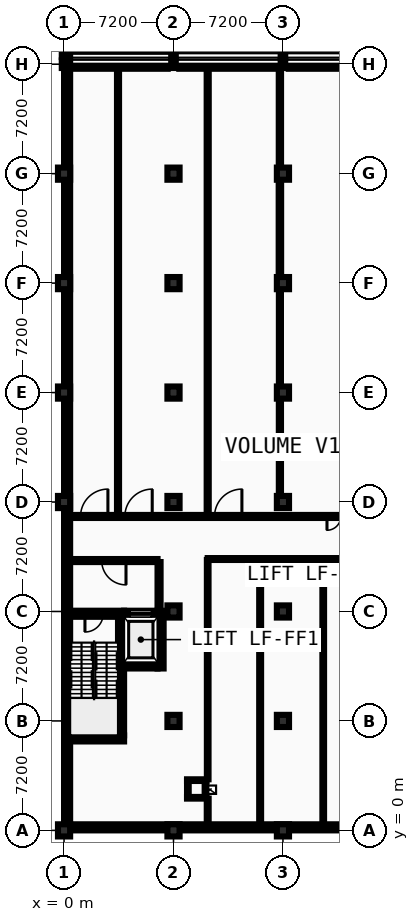
"""IFC4 building model, lengths in metres.
Left out: names, types, materials, properties, quantities, classifications, styles, units other than length and angle.
Written with IfcOpenShell. Run it as: python <this file> out.ifc"""

import sys

from ifc_helpers import new_model, si_unit, direction, frame, frame_2d, origin, origin_2d, place, context, subcontext, project, spatial, rectangle, i_section, extrude, element, fill, save


model = new_model("IFC4")
c1 = context("Model", 3, precision=1e-05, world=origin(), true_north=direction((0.0, 1.0)))
c2 = subcontext(c1, "Body", "Model", "MODEL_VIEW")
j1 = project(units=[si_unit("LENGTHUNIT", "METRE"), si_unit("PLANEANGLEUNIT", "RADIAN")], contexts=[c1])
p1 = place(None, origin())
s1 = spatial("IfcSite", under=j1, at=p1, CompositionType="ELEMENT")
p2 = place(p1, origin())
s2 = spatial("IfcBuilding", under=s1, at=p2, CompositionType="ELEMENT")
p3 = place(p2, frame((0.0, 0.0, -4.8)))
s3 = spatial("IfcBuildingStorey", under=s2, at=p3, CompositionType="ELEMENT", Elevation=-4.8)
for number, where, z_axis, x_axis in (
    (1, (0.0, 0.0, 0.0), (0.0, 0.0, 1.0), (1.0, 0.0, 0.0)),
    (2, (0.0, 21.6, 0.0), (0.0, 0.0, 1.0), (1.0, 0.0, 0.0)),
    (3, (0.0, 28.8, 0.0), (0.0, 0.0, 1.0), (1.0, 0.0, 0.0)),
    (4, (0.0, 36.0, 0.0), (0.0, 0.0, 1.0), (1.0, 0.0, 0.0)),
    (5, (0.0, 43.2, 0.0), (0.0, 0.0, 1.0), (1.0, 0.0, 0.0)),
):
    element("IfcColumn", number, at=place(p3, frame(where, z_axis=z_axis, x_axis=x_axis)), inside=s3, PredefinedType="COLUMN", context=c2, shape_type="SweptSolid", body=[
        extrude(rectangle(XDim=0.8, YDim=0.8, at=origin_2d()), origin(), (0.0, 0.0, 1.0), 4.8),
    ])
for number, where, z_axis, x_axis in (
    (6, (0.0, 50.4, 0.0), (0.0, 0.0, 1.0), (1.0, 0.0, 0.0)),
    (7, (0.0, 51.12, 0.0), (0.0, 0.0, 1.0), (1.0, 0.0, 0.0)),
):
    element("IfcColumn", number, at=place(p3, frame(where, z_axis=z_axis, x_axis=x_axis)), inside=s3, PredefinedType="COLUMN", context=c2, shape_type="SweptSolid", body=[
        extrude(i_section(OverallWidth=0.3, OverallDepth=0.5, WebThickness=0.014, FlangeThickness=0.028, FilletRadius=0.027, at=origin_2d()), origin(), (0.0, 0.0, 1.0), 4.8),
    ])
for number, where, z_axis, x_axis in (
    (8, (7.2, 0.0, 0.0), (0.0, 0.0, 1.0), (1.0, 0.0, 0.0)),
    (9, (7.2, 7.2, 0.0), (0.0, 0.0, 1.0), (1.0, 0.0, 0.0)),
    (10, (7.2, 14.4, 0.0), (0.0, 0.0, 1.0), (1.0, 0.0, 0.0)),
    (11, (7.2, 21.6, 0.0), (0.0, 0.0, 1.0), (1.0, 0.0, 0.0)),
    (12, (7.2, 28.8, 0.0), (0.0, 0.0, 1.0), (1.0, 0.0, 0.0)),
    (13, (7.2, 36.0, 0.0), (0.0, 0.0, 1.0), (1.0, 0.0, 0.0)),
    (14, (7.2, 43.2, 0.0), (0.0, 0.0, 1.0), (1.0, 0.0, 0.0)),
):
    element("IfcColumn", number, at=place(p3, frame(where, z_axis=z_axis, x_axis=x_axis)), inside=s3, PredefinedType="COLUMN", context=c2, shape_type="SweptSolid", body=[
        extrude(rectangle(XDim=0.8, YDim=0.8, at=origin_2d()), origin(), (0.0, 0.0, 1.0), 4.8),
    ])
for number, where, z_axis, x_axis in (
    (15, (7.2, 50.4, 0.0), (0.0, 0.0, 1.0), (1.0, 0.0, 0.0)),
    (16, (7.2, 51.12, 0.0), (0.0, 0.0, 1.0), (1.0, 0.0, 0.0)),
):
    element("IfcColumn", number, at=place(p3, frame(where, z_axis=z_axis, x_axis=x_axis)), inside=s3, PredefinedType="COLUMN", context=c2, shape_type="SweptSolid", body=[
        extrude(i_section(OverallWidth=0.3, OverallDepth=0.5, WebThickness=0.014, FlangeThickness=0.028, FilletRadius=0.027, at=origin_2d()), origin(), (0.0, 0.0, 1.0), 4.8),
    ])
for number, where, z_axis, x_axis in (
    (17, (14.4, 0.0, 0.0), (0.0, 0.0, 1.0), (1.0, 0.0, 0.0)),
    (18, (14.4, 7.2, 0.0), (0.0, 0.0, 1.0), (1.0, 0.0, 0.0)),
    (19, (14.4, 14.4, 0.0), (0.0, 0.0, 1.0), (1.0, 0.0, 0.0)),
    (20, (14.4, 21.6, 0.0), (0.0, 0.0, 1.0), (1.0, 0.0, 0.0)),
    (21, (14.4, 28.8, 0.0), (0.0, 0.0, 1.0), (1.0, 0.0, 0.0)),
    (22, (14.4, 36.0, 0.0), (0.0, 0.0, 1.0), (1.0, 0.0, 0.0)),
    (23, (14.4, 43.2, 0.0), (0.0, 0.0, 1.0), (1.0, 0.0, 0.0)),
):
    element("IfcColumn", number, at=place(p3, frame(where, z_axis=z_axis, x_axis=x_axis)), inside=s3, PredefinedType="COLUMN", context=c2, shape_type="SweptSolid", body=[
        extrude(rectangle(XDim=0.8, YDim=0.8, at=origin_2d()), origin(), (0.0, 0.0, 1.0), 4.8),
    ])
for number, where, z_axis, x_axis in (
    (24, (14.4, 50.4, 0.0), (0.0, 0.0, 1.0), (1.0, 0.0, 0.0)),
    (25, (14.4, 51.12, 0.0), (0.0, 0.0, 1.0), (1.0, 0.0, 0.0)),
):
    element("IfcColumn", number, at=place(p3, frame(where, z_axis=z_axis, x_axis=x_axis)), inside=s3, PredefinedType="COLUMN", context=c2, shape_type="SweptSolid", body=[
        extrude(i_section(OverallWidth=0.3, OverallDepth=0.5, WebThickness=0.014, FlangeThickness=0.028, FilletRadius=0.027, at=origin_2d()), origin(), (0.0, 0.0, 1.0), 4.8),
    ])
p4 = place(p3, frame((0.0, 0.2, 0.0), z_axis=(0.0, 0.0, 1.0), x_axis=(1.0, 0.0, 0.0)))
e26 = element("IfcWall", 26, at=p4, inside=s3, PredefinedType="USERDEFINED", context=c2, shape_type="SweptSolid", body=[
    extrude(rectangle(XDim=86.4, YDim=0.4, at=frame_2d((43.2, 0.0))), origin(), (0.0, 0.0, 1.0), 4.545),
])
p5 = place(p3, frame((0.2, 81.6, 0.0), z_axis=(0.0, 0.0, 1.0), x_axis=(0.0, -1.0, 0.0)))
e27 = element("IfcWall", 27, at=p5, inside=s3, PredefinedType="USERDEFINED", context=c2, shape_type="SweptSolid", body=[
    extrude(rectangle(XDim=81.2, YDim=0.4, at=frame_2d((40.6, 0.0))), origin(), (0.0, 0.0, 1.0), 4.545),
])
p6 = place(p3, frame((0.0, 6.05, 0.0), z_axis=(0.0, 0.0, 1.0), x_axis=(1.0, 0.0, 0.0)))
e28 = element("IfcWall", 28, at=p6, inside=s3, PredefinedType="SHEAR", context=c2, shape_type="SweptSolid", body=[
    extrude(rectangle(XDim=3.95, YDim=0.4, at=frame_2d((1.975, 0.0))), origin(), (0.0, 0.0, 1.0), 4.545),
])
p7 = place(p3, frame((0.0, 14.25, 0.0), z_axis=(0.0, 0.0, 1.0), x_axis=(1.0, 0.0, 0.0)))
e29 = element("IfcWall", 29, at=p7, inside=s3, PredefinedType="SHEAR", context=c2, shape_type="SweptSolid", body=[
    extrude(rectangle(XDim=3.95, YDim=0.4, at=frame_2d((1.975, 0.0))), origin(), (0.0, 0.0, 1.0), 4.545),
])
p8 = place(p7, frame((1.375, 0.0, 0.0)))
e30 = element("IfcOpeningElement", 30, at=p8, cuts=e29, PredefinedType="OPENING", context=c2, shape_type="SweptSolid", body=[
    extrude(rectangle(XDim=1.2, YDim=2.15, at=frame_2d((0.6, 1.075))), frame((0.0, 0.21, 0.0), z_axis=(0.0, -1.0, 0.0), x_axis=(1.0, 0.0, 0.0)), (0.0, 0.0, 1.0), 0.42),
])
p9 = place(p3, frame((3.75, 6.25, 0.0), z_axis=(0.0, 0.0, 1.0), x_axis=(0.0, 1.0, 0.0)))
e31 = element("IfcWall", 31, at=p9, inside=s3, PredefinedType="SHEAR", context=c2, shape_type="SweptSolid", body=[
    extrude(rectangle(XDim=7.8, YDim=0.4, at=frame_2d((3.9, 0.0))), origin(), (0.0, 0.0, 1.0), 4.545),
])
p10 = place(p3, frame((3.95, 10.85, 0.0), z_axis=(0.0, 0.0, 1.0), x_axis=(1.0, 0.0, 0.0)))
e32 = element("IfcWall", 32, at=p10, inside=s3, PredefinedType="SHEAR", context=c2, shape_type="SweptSolid", body=[
    extrude(rectangle(XDim=2.2, YDim=0.4, at=frame_2d((1.1, 0.0))), origin(), (0.0, 0.0, 1.0), 4.545),
])
p11 = place(p3, frame((3.95, 14.25, 0.0), z_axis=(0.0, 0.0, 1.0), x_axis=(1.0, 0.0, 0.0)))
e33 = element("IfcWall", 33, at=p11, inside=s3, PredefinedType="SHEAR", context=c2, shape_type="SweptSolid", body=[
    extrude(rectangle(XDim=2.2, YDim=0.4, at=frame_2d((1.1, 0.0))), origin(), (0.0, 0.0, 1.0), 4.545),
])
p12 = place(p11, frame((0.4, 0.0, 0.0)))
e34 = element("IfcOpeningElement", 34, at=p12, cuts=e33, PredefinedType="OPENING", context=c2, shape_type="SweptSolid", body=[
    extrude(rectangle(XDim=1.4, YDim=2.2, at=frame_2d((0.7, 1.1))), frame((0.0, 0.21, 0.0), z_axis=(0.0, -1.0, 0.0), x_axis=(1.0, 0.0, 0.0)), (0.0, 0.0, 1.0), 0.42),
])
p13 = place(p3, frame((6.35, 10.65, 0.0), z_axis=(0.0, 0.0, 1.0), x_axis=(0.0, 1.0, 0.0)))
e35 = element("IfcWall", 35, at=p13, inside=s3, PredefinedType="SHEAR", context=c2, shape_type="SweptSolid", body=[
    extrude(rectangle(XDim=3.8, YDim=0.4, at=frame_2d((1.9, 0.0))), origin(), (0.0, 0.0, 1.0), 4.545),
])
p14 = place(p3, frame((0.4, 17.75, 0.0), z_axis=(0.0, 0.0, 1.0), x_axis=(1.0, 0.0, 0.0)))
e36 = element("IfcWall", 36, at=p14, inside=s3, PredefinedType="PARTITIONING", context=c2, shape_type="SweptSolid", body=[
    extrude(rectangle(XDim=5.75, YDim=0.2, at=frame_2d((2.875, 0.0))), origin(), (0.0, 0.0, 1.0), 4.545),
])
p15 = place(p14, frame((2.075, 0.0, 0.0)))
e37 = element("IfcOpeningElement", 37, at=p15, cuts=e36, PredefinedType="OPENING", context=c2, shape_type="SweptSolid", body=[
    extrude(rectangle(XDim=1.6, YDim=2.2, at=frame_2d((0.8, 1.1))), frame((0.0, 0.11, 0.0), z_axis=(0.0, -1.0, 0.0), x_axis=(1.0, 0.0, 0.0)), (0.0, 0.0, 1.0), 0.22),
])
p16 = place(p3, frame((6.25, 14.45, 0.0), z_axis=(0.0, 0.0, 1.0), x_axis=(0.0, 1.0, 0.0)))
e38 = element("IfcWall", 38, at=p16, inside=s3, PredefinedType="PARTITIONING", context=c2, shape_type="SweptSolid", body=[
    extrude(rectangle(XDim=3.2, YDim=0.2, at=frame_2d((1.6, 0.0))), origin(), (0.0, 0.0, 1.0), 4.545),
])
for number, where, z_axis, x_axis in (
    (39, (8.09, 2.145, 0.0), (0.0, 0.0, 1.0), (1.0, 0.0, 0.0)),
    (40, (8.09, 3.305, 0.0), (0.0, 0.0, 1.0), (1.0, 0.0, 0.0)),
):
    element("IfcWall", number, at=place(p3, frame(where, z_axis=z_axis, x_axis=x_axis)), inside=s3, PredefinedType="PARTITIONING", context=c2, shape_type="SweptSolid", body=[
        extrude(rectangle(XDim=1.27, YDim=0.11, at=frame_2d((0.635, 0.0))), origin(), (0.0, 0.0, 1.0), 4.54),
    ])
for number, where, z_axis, x_axis in (
    (41, (8.145, 2.2, 0.0), (0.0, 0.0, 1.0), (0.0, 1.0, 0.0)),
    (42, (9.305, 2.2, 0.0), (0.0, 0.0, 1.0), (0.0, 1.0, 0.0)),
):
    element("IfcWall", number, at=place(p3, frame(where, z_axis=z_axis, x_axis=x_axis)), inside=s3, PredefinedType="PARTITIONING", context=c2, shape_type="SweptSolid", body=[
        extrude(rectangle(XDim=1.05, YDim=0.11, at=frame_2d((0.525, 0.0))), origin(), (0.0, 0.0, 1.0), 4.54),
    ])
p17 = place(p3, frame((9.45, 17.85, 0.0), z_axis=(0.0, 0.0, 1.0), x_axis=(1.0, 0.0, 0.0)))
e43 = element("IfcWall", 43, at=p17, inside=s3, PredefinedType="PARTITIONING", context=c2, shape_type="SweptSolid", body=[
    extrude(rectangle(XDim=12.75, YDim=0.125, at=frame_2d((6.375, 0.0))), origin(), (0.0, 0.0, 1.0), 4.545),
])
p18 = place(p17, frame((1.225, 0.0, 0.0)))
e44 = element("IfcOpeningElement", 44, at=p18, cuts=e43, PredefinedType="OPENING", context=c2, shape_type="SweptSolid", body=[
    extrude(rectangle(XDim=1.0, YDim=2.1, at=frame_2d((0.5, 1.05))), frame((0.0, 0.073, 0.0), z_axis=(0.0, -1.0, 0.0), x_axis=(1.0, 0.0, 0.0)), (0.0, 0.0, 1.0), 0.145),
])
p19 = place(p17, frame((6.25, 0.0, 0.0)))
e45 = element("IfcOpeningElement", 45, at=p19, cuts=e43, PredefinedType="OPENING", context=c2, shape_type="SweptSolid", body=[
    extrude(rectangle(XDim=0.9, YDim=2.1, at=frame_2d((0.45, 1.05))), frame((0.0, 0.073, 0.0), z_axis=(0.0, -1.0, 0.0), x_axis=(1.0, 0.0, 0.0)), (0.0, 0.0, 1.0), 0.145),
])
p20 = place(p17, frame((8.05, 0.0, 0.0)))
e46 = element("IfcOpeningElement", 46, at=p20, cuts=e43, PredefinedType="OPENING", context=c2, shape_type="SweptSolid", body=[
    extrude(rectangle(XDim=0.88, YDim=2.04, at=frame_2d((0.44, 1.02))), frame((0.0, 0.073, 0.0), z_axis=(0.0, -1.0, 0.0), x_axis=(1.0, 0.0, 0.0)), (0.0, 0.0, 1.0), 0.145),
])
p21 = place(p3, frame((0.42, 20.65, 0.0), z_axis=(0.0, 0.0, 1.0), x_axis=(1.0, 0.0, 0.0)))
e47 = element("IfcWall", 47, at=p21, inside=s3, PredefinedType="PARTITIONING", context=c2, shape_type="SweptSolid", body=[
    extrude(rectangle(XDim=28.18, YDim=0.2, at=frame_2d((14.09, 0.0))), origin(), (0.0, 0.0, 1.0), 4.545),
])
p22 = place(p21, frame((0.665, 0.0, 0.0)))
e48 = element("IfcOpeningElement", 48, at=p22, cuts=e47, PredefinedType="OPENING", context=c2, shape_type="SweptSolid", body=[
    extrude(rectangle(XDim=1.8, YDim=2.3, at=frame_2d((0.9, 1.15))), frame((0.0, 0.11, 0.0), z_axis=(0.0, -1.0, 0.0), x_axis=(1.0, 0.0, 0.0)), (0.0, 0.0, 1.0), 0.22),
])
p23 = place(p21, frame((9.48, 0.0, 0.0)))
e49 = element("IfcOpeningElement", 49, at=p23, cuts=e47, PredefinedType="OPENING", context=c2, shape_type="SweptSolid", body=[
    extrude(rectangle(XDim=1.8, YDim=2.3, at=frame_2d((0.9, 1.15))), frame((0.0, 0.11, 0.0), z_axis=(0.0, -1.0, 0.0), x_axis=(1.0, 0.0, 0.0)), (0.0, 0.0, 1.0), 0.22),
])
p24 = place(p21, frame((3.58, 0.0, 0.0)))
e50 = element("IfcOpeningElement", 50, at=p24, cuts=e47, PredefinedType="OPENING", context=c2, shape_type="SweptSolid", body=[
    extrude(rectangle(XDim=1.8, YDim=2.3, at=frame_2d((0.9, 1.15))), frame((0.0, 0.11, 0.0), z_axis=(0.0, -1.0, 0.0), x_axis=(1.0, 0.0, 0.0)), (0.0, 0.0, 1.0), 0.22),
])
p25 = place(p21, frame((16.877, 0.0, 0.0)))
e51 = element("IfcOpeningElement", 51, at=p25, cuts=e47, PredefinedType="OPENING", context=c2, shape_type="SweptSolid", body=[
    extrude(rectangle(XDim=0.906, YDim=2.04, at=frame_2d((0.453, 1.02))), frame((0.0, 0.11, 0.0), z_axis=(0.0, -1.0, 0.0), x_axis=(1.0, 0.0, 0.0)), (0.0, 0.0, 1.0), 0.22),
])
p26 = place(p21, frame((24.064, 0.0, 0.0)))
e52 = element("IfcOpeningElement", 52, at=p26, cuts=e47, PredefinedType="OPENING", context=c2, shape_type="SweptSolid", body=[
    extrude(rectangle(XDim=0.932, YDim=2.04, at=frame_2d((0.466, 1.02))), frame((0.0, 0.11, 0.0), z_axis=(0.0, -1.0, 0.0), x_axis=(1.0, 0.0, 0.0)), (0.0, 0.0, 1.0), 0.22),
])
p27 = place(p3, frame((0.42, 50.2, 0.0), z_axis=(0.0, 0.0, 1.0), x_axis=(1.0, 0.0, 0.0)))
e53 = element("IfcWall", 53, at=p27, inside=s3, PredefinedType="PARTITIONING", context=c2, shape_type="SweptSolid", body=[
    extrude(rectangle(XDim=6.4, YDim=0.2, at=frame_2d((3.2, 0.0))), origin(), (0.0, 0.0, 1.0), 4.095),
])
for number, where, z_axis, x_axis in (
    (54, (7.58, 50.2, 0.0), (0.0, 0.0, 1.0), (1.0, 0.0, 0.0)),
    (55, (14.78, 50.2, 0.0), (0.0, 0.0, 1.0), (1.0, 0.0, 0.0)),
):
    element("IfcWall", number, at=place(p3, frame(where, z_axis=z_axis, x_axis=x_axis)), inside=s3, PredefinedType="PARTITIONING", context=c2, shape_type="SweptSolid", body=[
        extrude(rectangle(XDim=6.44, YDim=0.2, at=frame_2d((3.22, 0.0))), origin(), (0.0, 0.0, 1.0), 4.095),
    ])
p28 = place(p3, frame((3.55, 20.75, 0.0), z_axis=(0.0, 0.0, 1.0), x_axis=(0.0, 1.0, 0.0)))
e56 = element("IfcWall", 56, at=p28, inside=s3, PredefinedType="PARTITIONING", context=c2, shape_type="SweptSolid", body=[
    extrude(rectangle(XDim=29.35, YDim=0.135, at=frame_2d((14.675, 0.0))), origin(), (0.0, 0.0, 1.0), 4.545),
])
p29 = place(p3, frame((9.45, 0.4, 0.0), z_axis=(0.0, 0.0, 1.0), x_axis=(0.0, 1.0, 0.0)))
e57 = element("IfcWall", 57, at=p29, inside=s3, PredefinedType="PARTITIONING", context=c2, shape_type="SweptSolid", body=[
    extrude(rectangle(XDim=1.69, YDim=0.125, at=frame_2d((0.845, 0.0))), origin(), (0.0, 0.0, 1.0), 4.235),
])
p30 = place(p3, frame((9.45, 3.36, 0.0), z_axis=(0.0, 0.0, 1.0), x_axis=(0.0, 1.0, 0.0)))
e58 = element("IfcWall", 58, at=p30, inside=s3, PredefinedType="PARTITIONING", context=c2, shape_type="SweptSolid", body=[
    extrude(rectangle(XDim=14.427, YDim=0.11, at=frame_2d((7.214, 0.0))), origin(), (0.0, 0.0, 1.0), 4.235),
])
p31 = place(p3, frame((9.45, 20.75, 0.0), z_axis=(0.0, 0.0, 1.0), x_axis=(0.0, 1.0, 0.0)))
e59 = element("IfcWall", 59, at=p31, inside=s3, PredefinedType="PARTITIONING", context=c2, shape_type="SweptSolid", body=[
    extrude(rectangle(XDim=29.35, YDim=0.135, at=frame_2d((14.675, 0.0))), origin(), (0.0, 0.0, 1.0), 4.235),
])
p32 = place(p3, frame((12.9, 0.4, 0.0), z_axis=(0.0, 0.0, 1.0), x_axis=(0.0, 1.0, 0.0)))
e60 = element("IfcWall", 60, at=p32, inside=s3, PredefinedType="PARTITIONING", context=c2, shape_type="SweptSolid", body=[
    extrude(rectangle(XDim=17.388, YDim=0.125, at=frame_2d((8.694, 0.0))), origin(), (0.0, 0.0, 1.0), 4.545),
])
p33 = place(p3, frame((14.2, 21.98, 0.0), z_axis=(0.0, 0.0, 1.0), x_axis=(0.0, 1.0, 0.0)))
e61 = element("IfcWall", 61, at=p33, inside=s3, PredefinedType="PARTITIONING", context=c2, shape_type="SweptSolid", body=[
    extrude(rectangle(XDim=6.44, YDim=0.142, at=frame_2d((3.22, 0.0))), origin(), (0.0, 0.0, 1.0), 4.245),
])
p34 = place(p3, frame((14.2, 29.18, 0.0), z_axis=(0.0, 0.0, 1.0), x_axis=(0.0, 1.0, 0.0)))
e62 = element("IfcWall", 62, at=p34, inside=s3, PredefinedType="PARTITIONING", context=c2, shape_type="SweptSolid", body=[
    extrude(rectangle(XDim=6.44, YDim=0.135, at=frame_2d((3.22, 0.0))), origin(), (0.0, 0.0, 1.0), 4.245),
])
p35 = place(p3, frame((14.2, 36.38, 0.0), z_axis=(0.0, 0.0, 1.0), x_axis=(0.0, 1.0, 0.0)))
e63 = element("IfcWall", 63, at=p35, inside=s3, PredefinedType="PARTITIONING", context=c2, shape_type="SweptSolid", body=[
    extrude(rectangle(XDim=6.44, YDim=0.16, at=frame_2d((3.22, 0.0))), origin(), (0.0, 0.0, 1.0), 4.245),
])
p36 = place(p3, frame((14.2, 43.58, 0.0), z_axis=(0.0, 0.0, 1.0), x_axis=(0.0, 1.0, 0.0)))
e64 = element("IfcWall", 64, at=p36, inside=s3, PredefinedType="PARTITIONING", context=c2, shape_type="SweptSolid", body=[
    extrude(rectangle(XDim=6.44, YDim=0.15, at=frame_2d((3.22, 0.0))), origin(), (0.0, 0.0, 1.0), 4.245),
])
p37 = place(p3, frame((17.05, 0.4, 0.0), z_axis=(0.0, 0.0, 1.0), x_axis=(0.0, 1.0, 0.0)))
e65 = element("IfcWall", 65, at=p37, inside=s3, PredefinedType="PARTITIONING", context=c2, shape_type="SweptSolid", body=[
    extrude(rectangle(XDim=17.388, YDim=0.11, at=frame_2d((8.694, 0.0))), origin(), (0.0, 0.0, 1.0), 4.545),
])
p38 = place(p8, frame((1.2, 0.0, 0.0), z_axis=(0.0, 0.0, 1.0), x_axis=(-1.0, 0.0, 0.0)))
e66 = element("IfcDoor", 66, at=p38, inside=s3, OperationType="SINGLE_SWING_LEFT", PredefinedType="DOOR", context=c2, shape_type="SweptSolid", body=[
    extrude(rectangle(XDim=1.2, YDim=2.15, at=frame_2d((0.6, 1.075))), frame((0.0, 0.025, 0.0), z_axis=(0.0, -1.0, 0.0), x_axis=(1.0, 0.0, 0.0)), (0.0, 0.0, 1.0), 0.05),
])
fill(e30, e66)
p39 = place(p12, origin())
e67 = element("IfcDoor", 67, at=p39, inside=s3, OperationType="SLIDING_TO_LEFT", PredefinedType="DOOR", context=c2, shape_type="SweptSolid", body=[
    extrude(rectangle(XDim=1.4, YDim=2.2, at=frame_2d((0.7, 1.1))), frame((0.0, 0.025, 0.0), z_axis=(0.0, -1.0, 0.0), x_axis=(1.0, 0.0, 0.0)), (0.0, 0.0, 1.0), 0.05),
])
fill(e34, e67)
p40 = place(p15, origin())
e68 = element("IfcDoor", 68, at=p40, inside=s3, OperationType="DOUBLE_DOOR_SINGLE_SWING", PredefinedType="DOOR", context=c2, shape_type="SweptSolid", body=[
    extrude(rectangle(XDim=1.6, YDim=2.2, at=frame_2d((0.8, 1.1))), frame((0.0, 0.025, 0.0), z_axis=(0.0, -1.0, 0.0), x_axis=(1.0, 0.0, 0.0)), (0.0, 0.0, 1.0), 0.05),
])
fill(e37, e68)
p41 = place(p18, origin())
e69 = element("IfcDoor", 69, at=p41, inside=s3, OperationType="SLIDING_TO_LEFT", PredefinedType="DOOR", context=c2, shape_type="SweptSolid", body=[
    extrude(rectangle(XDim=1.0, YDim=2.1, at=frame_2d((0.5, 1.05))), frame((0.0, 0.025, 0.0), z_axis=(0.0, -1.0, 0.0), x_axis=(1.0, 0.0, 0.0)), (0.0, 0.0, 1.0), 0.05),
])
fill(e44, e69)
p42 = place(p19, origin())
e70 = element("IfcDoor", 70, at=p42, inside=s3, OperationType="SINGLE_SWING_RIGHT", PredefinedType="DOOR", context=c2, shape_type="SweptSolid", body=[
    extrude(rectangle(XDim=0.9, YDim=2.1, at=frame_2d((0.45, 1.05))), frame((0.0, 0.025, 0.0), z_axis=(0.0, -1.0, 0.0), x_axis=(1.0, 0.0, 0.0)), (0.0, 0.0, 1.0), 0.05),
])
fill(e45, e70)
p43 = place(p20, origin())
e71 = element("IfcDoor", 71, at=p43, inside=s3, OperationType="SINGLE_SWING_RIGHT", PredefinedType="DOOR", context=c2, shape_type="SweptSolid", body=[
    extrude(rectangle(XDim=0.88, YDim=2.04, at=frame_2d((0.44, 1.02))), frame((0.0, 0.025, 0.0), z_axis=(0.0, -1.0, 0.0), x_axis=(1.0, 0.0, 0.0)), (0.0, 0.0, 1.0), 0.05),
])
fill(e46, e71)
p44 = place(p22, frame((1.8, 0.0, 0.0), z_axis=(0.0, 0.0, 1.0), x_axis=(-1.0, 0.0, 0.0)))
e72 = element("IfcDoor", 72, at=p44, inside=s3, OperationType="DOUBLE_DOOR_SINGLE_SWING", PredefinedType="DOOR", context=c2, shape_type="SweptSolid", body=[
    extrude(rectangle(XDim=1.8, YDim=2.3, at=frame_2d((0.9, 1.15))), frame((0.0, 0.025, 0.0), z_axis=(0.0, -1.0, 0.0), x_axis=(1.0, 0.0, 0.0)), (0.0, 0.0, 1.0), 0.05),
])
fill(e48, e72)
p45 = place(p23, frame((1.8, 0.0, 0.0), z_axis=(0.0, 0.0, 1.0), x_axis=(-1.0, 0.0, 0.0)))
e73 = element("IfcDoor", 73, at=p45, inside=s3, OperationType="DOUBLE_DOOR_SINGLE_SWING", PredefinedType="DOOR", context=c2, shape_type="SweptSolid", body=[
    extrude(rectangle(XDim=1.8, YDim=2.3, at=frame_2d((0.9, 1.15))), frame((0.0, 0.025, 0.0), z_axis=(0.0, -1.0, 0.0), x_axis=(1.0, 0.0, 0.0)), (0.0, 0.0, 1.0), 0.05),
])
fill(e49, e73)
p46 = place(p24, frame((1.8, 0.0, 0.0), z_axis=(0.0, 0.0, 1.0), x_axis=(-1.0, 0.0, 0.0)))
e74 = element("IfcDoor", 74, at=p46, inside=s3, OperationType="DOUBLE_DOOR_SINGLE_SWING", PredefinedType="DOOR", context=c2, shape_type="SweptSolid", body=[
    extrude(rectangle(XDim=1.8, YDim=2.3, at=frame_2d((0.9, 1.15))), frame((0.0, 0.025, 0.0), z_axis=(0.0, -1.0, 0.0), x_axis=(1.0, 0.0, 0.0)), (0.0, 0.0, 1.0), 0.05),
])
fill(e50, e74)
p47 = place(p25, frame((0.906, 0.0, 0.0), z_axis=(0.0, 0.0, 1.0), x_axis=(-1.0, 0.0, 0.0)))
e75 = element("IfcDoor", 75, at=p47, inside=s3, OperationType="SINGLE_SWING_LEFT", PredefinedType="DOOR", context=c2, shape_type="SweptSolid", body=[
    extrude(rectangle(XDim=0.906, YDim=2.04, at=frame_2d((0.453, 1.02))), frame((0.0, 0.025, 0.0), z_axis=(0.0, -1.0, 0.0), x_axis=(1.0, 0.0, 0.0)), (0.0, 0.0, 1.0), 0.05),
])
fill(e51, e75)
save(model, sys.argv[1])
